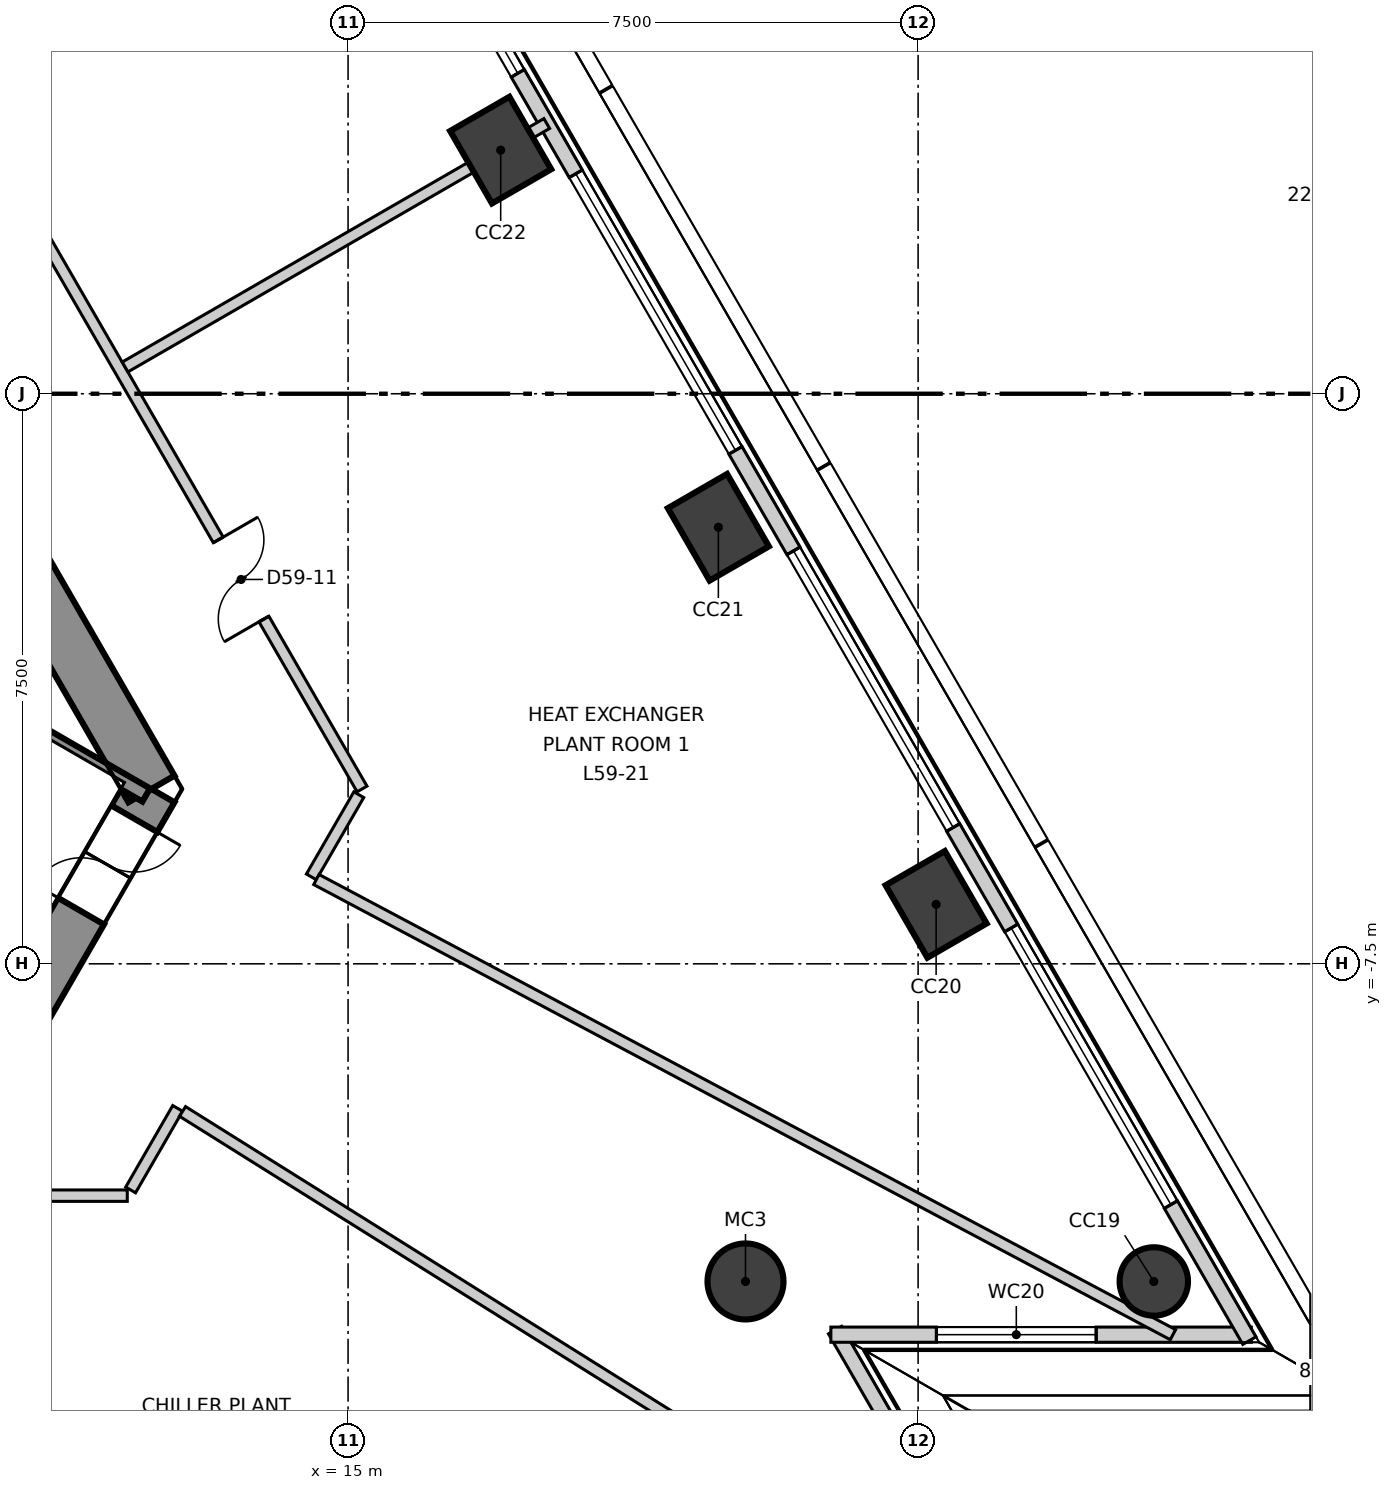
"""IFC4 building model, lengths in metres.
Left out: names, types, materials, properties, quantities, classifications, styles, units other than length and angle.
Written with IfcOpenShell. Run it as: python <this file> out.ifc"""

import sys

from ifc_helpers import new_model, si_unit, direction, frame, frame_2d, origin, origin_2d, place, context, subcontext, project, spatial, polyline, rectangle, circle, outline, extrude, element, fill, save


model = new_model("IFC4")
c1 = context("Model", 3, precision=1e-05, world=origin(), true_north=direction((0.0, 1.0)))
c2 = subcontext(c1, "Body", "Model", "MODEL_VIEW")
j1 = project(units=[si_unit("LENGTHUNIT", "METRE"), si_unit("PLANEANGLEUNIT", "RADIAN")], contexts=[c1])
p1 = place(None, origin())
s1 = spatial("IfcSite", under=j1, at=p1, CompositionType="ELEMENT")
p2 = place(p1, origin())
s2 = spatial("IfcBuilding", under=s1, at=p2, CompositionType="ELEMENT")
p3 = place(p2, frame((0.0, 0.0, 251.3)))
s3 = spatial("IfcBuildingStorey", under=s2, at=p3, CompositionType="ELEMENT", Elevation=251.3)
p4 = place(p3, frame((10.71, -8.15, -0.3), z_axis=(0.0, 0.0, 1.0), x_axis=(0.49999337185, 0.866029230515, 0.0)))
e1 = element("IfcWall", 1, at=p4, inside=s3, PredefinedType="SHEAR", context=c2, shape_type="SweptSolid", body=[
    extrude(outline(polyline([(-0.202, -0.35), (1.703, -0.35), (3.608, -0.35), (3.204, 0.35), (1.703, 0.35), (0.202, 0.35), (-0.202, -0.35)])), origin(), (0.0, 0.0, 1.0), 4.2),
])
p5 = place(p4, frame((1.553, 0.0, 0.3)))
e2 = element("IfcOpeningElement", 2, at=p5, cuts=e1, PredefinedType="OPENING", context=c2, shape_type="SweptSolid", body=[
    extrude(rectangle(XDim=1.4, YDim=2.1, at=frame_2d((0.7, 1.05))), frame((0.0, 0.36, 0.0), z_axis=(0.0, -1.0, 0.0), x_axis=(1.0, 0.0, 0.0)), (0.0, 0.0, 1.0), 0.72),
])
p6 = place(p3, frame((12.413, -5.2, -0.3), z_axis=(0.0, 0.0, 1.0), x_axis=(-0.500011533395, 0.866018744874, 0.0)))
e3 = element("IfcWall", 3, at=p6, inside=s3, PredefinedType="SHEAR", context=c2, shape_type="SweptSolid", body=[
    extrude(outline(polyline([(-0.202, -0.35), (1.782, -0.35), (3.766, -0.35), (5.75, -0.35), (7.734, -0.35), (9.718, -0.35), (11.702, -0.35), (13.686, -0.35), (15.67, -0.35), (17.654, -0.35), (19.638, -0.35), (21.622, -0.35), (21.218, 0.35), (19.307, 0.35), (17.397, 0.35), (15.486, 0.35), (13.576, 0.35), (11.665, 0.35), (9.755, 0.35), (7.844, 0.35), (5.934, 0.35), (4.023, 0.35), (2.113, 0.35), (0.202, 0.35), (-0.202, -0.35)])), origin(), (0.0, 0.0, 1.0), 4.2),
])
p7 = place(p6, frame((4.055, 0.0, 0.3)))
e4 = element("IfcOpeningElement", 4, at=p7, cuts=e3, PredefinedType="OPENING", context=c2, shape_type="SweptSolid", body=[
    extrude(rectangle(XDim=0.9, YDim=2.1, at=frame_2d((0.45, 1.05))), frame((0.0, 0.36, 0.0), z_axis=(0.0, -1.0, 0.0), x_axis=(1.0, 0.0, 0.0)), (0.0, 0.0, 1.0), 0.72),
])
p8 = place(p6, frame((16.465, 0.0, 0.3)))
e5 = element("IfcOpeningElement", 5, at=p8, cuts=e3, PredefinedType="OPENING", context=c2, shape_type="SweptSolid", body=[
    extrude(rectangle(XDim=0.9, YDim=2.1, at=frame_2d((0.45, 1.05))), frame((0.0, 0.36, 0.0), z_axis=(0.0, -1.0, 0.0), x_axis=(1.0, 0.0, 0.0)), (0.0, 0.0, 1.0), 0.72),
])
p9 = place(p3, frame((25.601, -11.679, -0.3), z_axis=(0.0, 0.0, 1.0), x_axis=(-0.5, 0.866025403784, 0.0)))
e6 = element("IfcColumn", 6, at=p9, inside=s3, PredefinedType="COLUMN", context=c2, shape_type="SweptSolid", body=[
    extrude(circle(Radius=0.45, at=origin_2d()), origin(), (0.0, 0.0, 1.0), 4.2),
])
for number, where, z_axis, x_axis in (
    (7, (22.737, -6.718, -0.3), (0.0, 0.0, 1.0), (-0.5, 0.866, 0.0)),
    (8, (19.872, -1.757, -0.3), (0.0, 0.0, 1.0), (-0.5, 0.866, 0.0)),
    (9, (17.008, 3.205, -0.3), (0.0, 0.0, 1.0), (-0.5, 0.866, 0.0)),
):
    element("IfcColumn", number, at=place(p3, frame(where, z_axis=z_axis, x_axis=x_axis)), inside=s3, PredefinedType="COLUMN", context=c2, shape_type="SweptSolid", body=[
        extrude(rectangle(XDim=1.1, YDim=0.9, at=origin_2d()), origin(), (0.0, 0.0, 1.0), 4.2),
    ])
p10 = place(p3, frame((20.229, -11.679, -0.3), z_axis=(0.0, 0.0, 1.0), x_axis=(1.0, 0.0, 0.0)))
e10 = element("IfcColumn", 10, at=p10, inside=s3, PredefinedType="COLUMN", context=c2, shape_type="SweptSolid", body=[
    extrude(circle(Radius=0.5, at=origin_2d()), origin(), (0.0, 0.0, 1.0), 4.2),
])
p11 = place(p3, frame((24.173, -17.11, 0.0), z_axis=(0.0, 0.0, 1.0), x_axis=(-0.499926164748, 0.866068028391, 0.0)))
e11 = element("IfcWall", 11, at=p11, inside=s3, PredefinedType="ELEMENTEDWALL", context=c2, shape_type="SweptSolid", body=[
    extrude(rectangle(XDim=5.533, YDim=0.2, at=frame_2d((2.767, 0.0))), origin(), (0.0, 0.0, 1.0), 3.9),
])
p12 = place(p11, frame((1.99, 0.0, 0.9)))
e12 = element("IfcOpeningElement", 12, at=p12, cuts=e11, PredefinedType="OPENING", context=c2, shape_type="SweptSolid", body=[
    extrude(rectangle(XDim=2.1, YDim=2.5, at=frame_2d((1.05, 1.25))), frame((0.0, 0.11, 0.0), z_axis=(0.0, -1.0, 0.0), x_axis=(1.0, 0.0, 0.0)), (0.0, 0.0, 1.0), 0.22),
])
p13 = place(p3, frame((21.352, -12.379, 0.0), z_axis=(0.0, 0.0, 1.0), x_axis=(1.0, 0.0, 0.0)))
e13 = element("IfcWall", 13, at=p13, inside=s3, PredefinedType="ELEMENTEDWALL", context=c2, shape_type="SweptSolid", body=[
    extrude(rectangle(XDim=5.532, YDim=0.2, at=frame_2d((2.766, 0.0))), origin(), (0.0, 0.0, 1.0), 3.9),
])
p14 = place(p13, frame((1.39, 0.0, 0.9)))
e14 = element("IfcOpeningElement", 14, at=p14, cuts=e13, PredefinedType="OPENING", context=c2, shape_type="SweptSolid", body=[
    extrude(rectangle(XDim=2.1, YDim=2.5, at=frame_2d((1.05, 1.25))), frame((0.0, 0.11, 0.0), z_axis=(0.0, -1.0, 0.0), x_axis=(1.0, 0.0, 0.0)), (0.0, 0.0, 1.0), 0.22),
])
p15 = place(p3, frame((26.859, -12.457, 0.0), z_axis=(0.0, 0.0, 1.0), x_axis=(-0.500004868955, 0.866022592674, 0.0)))
e15 = element("IfcWall", 15, at=p15, inside=s3, PredefinedType="ELEMENTEDWALL", context=c2, shape_type="SweptSolid", body=[
    extrude(rectangle(XDim=48.416, YDim=0.2, at=frame_2d((24.208, 0.0))), origin(), (0.0, 0.0, 1.0), 3.9),
])
p16 = place(p15, frame((2.067, 0.0, 0.9)))
e16 = element("IfcOpeningElement", 16, at=p16, cuts=e15, PredefinedType="OPENING", context=c2, shape_type="SweptSolid", body=[
    extrude(rectangle(XDim=4.2, YDim=2.5, at=frame_2d((2.1, 1.25))), frame((0.0, 0.11, 0.0), z_axis=(0.0, -1.0, 0.0), x_axis=(1.0, 0.0, 0.0)), (0.0, 0.0, 1.0), 0.22),
])
p17 = place(p15, frame((7.796, 0.0, 0.9)))
e17 = element("IfcOpeningElement", 17, at=p17, cuts=e15, PredefinedType="OPENING", context=c2, shape_type="SweptSolid", body=[
    extrude(rectangle(XDim=4.2, YDim=2.5, at=frame_2d((2.1, 1.25))), frame((0.0, 0.11, 0.0), z_axis=(0.0, -1.0, 0.0), x_axis=(1.0, 0.0, 0.0)), (0.0, 0.0, 1.0), 0.22),
])
p18 = place(p15, frame((13.525, 0.0, 0.9)))
e18 = element("IfcOpeningElement", 18, at=p18, cuts=e15, PredefinedType="OPENING", context=c2, shape_type="SweptSolid", body=[
    extrude(rectangle(XDim=4.2, YDim=2.5, at=frame_2d((2.1, 1.25))), frame((0.0, 0.11, 0.0), z_axis=(0.0, -1.0, 0.0), x_axis=(1.0, 0.0, 0.0)), (0.0, 0.0, 1.0), 0.22),
])
p19 = place(p15, frame((19.253, 0.0, 0.9)))
e19 = element("IfcOpeningElement", 19, at=p19, cuts=e15, PredefinedType="OPENING", context=c2, shape_type="SweptSolid", body=[
    extrude(rectangle(XDim=4.2, YDim=2.5, at=frame_2d((2.1, 1.25))), frame((0.0, 0.11, 0.0), z_axis=(0.0, -1.0, 0.0), x_axis=(1.0, 0.0, 0.0)), (0.0, 0.0, 1.0), 0.22),
])
p20 = place(p15, frame((24.982, 0.0, 0.9)))
e20 = element("IfcOpeningElement", 20, at=p20, cuts=e15, PredefinedType="OPENING", context=c2, shape_type="SweptSolid", body=[
    extrude(rectangle(XDim=4.2, YDim=2.5, at=frame_2d((2.1, 1.25))), frame((0.0, 0.11, 0.0), z_axis=(0.0, -1.0, 0.0), x_axis=(1.0, 0.0, 0.0)), (0.0, 0.0, 1.0), 0.22),
])
p21 = place(p15, frame((30.711, 0.0, 0.9)))
e21 = element("IfcOpeningElement", 21, at=p21, cuts=e15, PredefinedType="OPENING", context=c2, shape_type="SweptSolid", body=[
    extrude(rectangle(XDim=4.2, YDim=2.5, at=frame_2d((2.1, 1.25))), frame((0.0, 0.11, 0.0), z_axis=(0.0, -1.0, 0.0), x_axis=(1.0, 0.0, 0.0)), (0.0, 0.0, 1.0), 0.22),
])
p22 = place(p15, frame((36.44, 0.0, 0.9)))
e22 = element("IfcOpeningElement", 22, at=p22, cuts=e15, PredefinedType="OPENING", context=c2, shape_type="SweptSolid", body=[
    extrude(rectangle(XDim=4.2, YDim=2.5, at=frame_2d((2.1, 1.25))), frame((0.0, 0.11, 0.0), z_axis=(0.0, -1.0, 0.0), x_axis=(1.0, 0.0, 0.0)), (0.0, 0.0, 1.0), 0.22),
])
p23 = place(p15, frame((42.168, 0.0, 0.9)))
e23 = element("IfcOpeningElement", 23, at=p23, cuts=e15, PredefinedType="OPENING", context=c2, shape_type="SweptSolid", body=[
    extrude(rectangle(XDim=4.2, YDim=2.5, at=frame_2d((2.1, 1.25))), frame((0.0, 0.11, 0.0), z_axis=(0.0, -1.0, 0.0), x_axis=(1.0, 0.0, 0.0)), (0.0, 0.0, 1.0), 0.22),
])
p24 = place(p3, frame((-12.009, -10.55, 0.0), z_axis=(0.0, 0.0, 1.0), x_axis=(1.0, 0.0, 0.0)))
e24 = element("IfcWall", 24, at=p24, inside=s3, PredefinedType="PARTITIONING", context=c2, shape_type="SweptSolid", body=[
    extrude(rectangle(XDim=24.104, YDim=0.15, at=frame_2d((12.052, 0.0))), origin(), (0.0, 0.0, 1.0), 3.9),
])
p25 = place(p24, frame((2.497, 0.0, 0.0)))
e25 = element("IfcOpeningElement", 25, at=p25, cuts=e24, PredefinedType="OPENING", context=c2, shape_type="SweptSolid", body=[
    extrude(rectangle(XDim=1.2, YDim=2.1, at=frame_2d((0.6, 1.05))), frame((0.0, 0.085, 0.0), z_axis=(0.0, -1.0, 0.0), x_axis=(1.0, 0.0, 0.0)), (0.0, 0.0, 1.0), 0.17),
])
p26 = place(p24, frame((8.644, 0.0, 0.0)))
e26 = element("IfcOpeningElement", 26, at=p26, cuts=e24, PredefinedType="OPENING", context=c2, shape_type="SweptSolid", body=[
    extrude(rectangle(XDim=1.0, YDim=2.1, at=frame_2d((0.5, 1.05))), frame((0.0, 0.085, 0.0), z_axis=(0.0, -1.0, 0.0), x_axis=(1.0, 0.0, 0.0)), (0.0, 0.0, 1.0), 0.17),
])
p27 = place(p24, frame((14.373, 0.0, 0.0)))
e27 = element("IfcOpeningElement", 27, at=p27, cuts=e24, PredefinedType="OPENING", context=c2, shape_type="SweptSolid", body=[
    extrude(rectangle(XDim=1.0, YDim=2.1, at=frame_2d((0.5, 1.05))), frame((0.0, 0.085, 0.0), z_axis=(0.0, -1.0, 0.0), x_axis=(1.0, 0.0, 0.0)), (0.0, 0.0, 1.0), 0.17),
])
p28 = place(p24, frame((20.321, 0.0, 0.0)))
e28 = element("IfcOpeningElement", 28, at=p28, cuts=e24, PredefinedType="OPENING", context=c2, shape_type="SweptSolid", body=[
    extrude(rectangle(XDim=1.2, YDim=2.1, at=frame_2d((0.6, 1.05))), frame((0.0, 0.085, 0.0), z_axis=(0.0, -1.0, 0.0), x_axis=(1.0, 0.0, 0.0)), (0.0, 0.0, 1.0), 0.17),
])
p29 = place(p3, frame((3.132, 15.675, 0.0), z_axis=(0.0, 0.0, 1.0), x_axis=(0.499994246357, -0.866028725626, 0.0)))
e29 = element("IfcWall", 29, at=p29, inside=s3, PredefinedType="PARTITIONING", context=c2, shape_type="SweptSolid", body=[
    extrude(rectangle(XDim=24.104, YDim=0.15, at=frame_2d((12.052, 0.0))), origin(), (0.0, 0.0, 1.0), 3.9),
])
p30 = place(p29, frame((20.321, 0.0, 0.0)))
e30 = element("IfcOpeningElement", 30, at=p30, cuts=e29, PredefinedType="OPENING", context=c2, shape_type="SweptSolid", body=[
    extrude(rectangle(XDim=1.2, YDim=2.1, at=frame_2d((0.6, 1.05))), frame((0.0, 0.085, 0.0), z_axis=(0.0, -1.0, 0.0), x_axis=(1.0, 0.0, 0.0)), (0.0, 0.0, 1.0), 0.17),
])
p31 = place(p29, frame((11.508, 0.0, 0.0)))
e31 = element("IfcOpeningElement", 31, at=p31, cuts=e29, PredefinedType="OPENING", context=c2, shape_type="SweptSolid", body=[
    extrude(rectangle(XDim=1.0, YDim=2.1, at=frame_2d((0.5, 1.05))), frame((0.0, 0.085, 0.0), z_axis=(0.0, -1.0, 0.0), x_axis=(1.0, 0.0, 0.0)), (0.0, 0.0, 1.0), 0.17),
])
p32 = place(p29, frame((2.497, 0.0, 0.0)))
e32 = element("IfcOpeningElement", 32, at=p32, cuts=e29, PredefinedType="OPENING", context=c2, shape_type="SweptSolid", body=[
    extrude(rectangle(XDim=1.2, YDim=2.1, at=frame_2d((0.6, 1.05))), frame((0.0, 0.085, 0.0), z_axis=(0.0, -1.0, 0.0), x_axis=(1.0, 0.0, 0.0)), (0.0, 0.0, 1.0), 0.17),
])
p33 = place(p3, frame((12.139, -10.475, 0.0), z_axis=(0.0, 0.0, 1.0), x_axis=(0.499785009086, 0.86614949327, 0.0)))
e33 = element("IfcWall", 33, at=p33, inside=s3, PredefinedType="PARTITIONING", context=c2, shape_type="SweptSolid", body=[
    extrude(rectangle(XDim=1.239, YDim=0.15, at=frame_2d((0.619, 0.0))), origin(), (0.0, 0.0, 1.0), 3.9),
])
p34 = place(p3, frame((14.517, -6.356, 0.0), z_axis=(0.0, 0.0, 1.0), x_axis=(0.499925626596, 0.866068339032, 0.0)))
e34 = element("IfcWall", 34, at=p34, inside=s3, PredefinedType="PARTITIONING", context=c2, shape_type="SweptSolid", body=[
    extrude(rectangle(XDim=1.248, YDim=0.15, at=frame_2d((0.624, 0.0))), origin(), (0.0, 0.0, 1.0), 3.9),
])
p35 = place(p3, frame((12.822, -9.442, 0.0), z_axis=(0.0, 0.0, 1.0), x_axis=(0.847570249745, -0.530683212233, 0.0)))
e35 = element("IfcWall", 35, at=p35, inside=s3, PredefinedType="PARTITIONING", context=c2, shape_type="SweptSolid", body=[
    extrude(rectangle(XDim=12.793, YDim=0.15, at=frame_2d((6.396, 0.0))), origin(), (0.0, 0.0, 1.0), 3.3),
])
p36 = place(p3, frame((12.066, 0.352, 0.0), z_axis=(0.0, 0.0, 1.0), x_axis=(0.866046605956, 0.499963274963, 0.0)))
e36 = element("IfcWall", 36, at=p36, inside=s3, PredefinedType="PARTITIONING", context=c2, shape_type="SweptSolid", body=[
    extrude(rectangle(XDim=6.406, YDim=0.15, at=frame_2d((3.203, 0.0))), origin(), (0.0, 0.0, 1.0), 3.9),
])
p37 = place(p3, frame((14.583, -6.391, 0.0), z_axis=(0.0, 0.0, 1.0), x_axis=(0.883096398923, -0.469191592219, 0.0)))
e37 = element("IfcWall", 37, at=p37, inside=s3, PredefinedType="PARTITIONING", context=c2, shape_type="SweptSolid", body=[
    extrude(rectangle(XDim=12.762, YDim=0.15, at=frame_2d((6.381, 0.0))), origin(), (0.0, 0.0, 1.0), 3.3),
])
p38 = place(p3, frame((6.529, -1.922, 0.0), z_axis=(0.0, 0.0, 1.0), x_axis=(0.866046323291, -0.499963764601, 0.0)))
e38 = element("IfcWall", 38, at=p38, inside=s3, PredefinedType="SOLIDWALL", context=c2, shape_type="SweptSolid", body=[
    extrude(rectangle(XDim=6.714, YDim=0.2, at=frame_2d((3.357, 0.0))), origin(), (0.0, 0.0, 1.0), 3.9),
])
p39 = place(p14, origin())
e39 = element("IfcWindow", 39, at=p39, inside=s3, PartitioningType="SINGLE_PANEL", PredefinedType="WINDOW", context=c2, shape_type="SweptSolid", body=[
    extrude(rectangle(XDim=2.1, YDim=2.5, at=frame_2d((1.05, 1.25))), frame((0.0, 0.03, 0.0), z_axis=(0.0, -1.0, 0.0), x_axis=(1.0, 0.0, 0.0)), (0.0, 0.0, 1.0), 0.06),
])
fill(e14, e39)
p40 = place(p16, origin())
e40 = element("IfcWindow", 40, at=p40, inside=s3, PartitioningType="SINGLE_PANEL", PredefinedType="WINDOW", context=c2, shape_type="SweptSolid", body=[
    extrude(rectangle(XDim=4.2, YDim=2.5, at=frame_2d((2.1, 1.25))), frame((0.0, 0.03, 0.0), z_axis=(0.0, -1.0, 0.0), x_axis=(1.0, 0.0, 0.0)), (0.0, 0.0, 1.0), 0.06),
])
fill(e16, e40)
p41 = place(p17, origin())
e41 = element("IfcWindow", 41, at=p41, inside=s3, PartitioningType="SINGLE_PANEL", PredefinedType="WINDOW", context=c2, shape_type="SweptSolid", body=[
    extrude(rectangle(XDim=4.2, YDim=2.5, at=frame_2d((2.1, 1.25))), frame((0.0, 0.03, 0.0), z_axis=(0.0, -1.0, 0.0), x_axis=(1.0, 0.0, 0.0)), (0.0, 0.0, 1.0), 0.06),
])
fill(e17, e41)
p42 = place(p18, origin())
e42 = element("IfcWindow", 42, at=p42, inside=s3, PartitioningType="SINGLE_PANEL", PredefinedType="WINDOW", context=c2, shape_type="SweptSolid", body=[
    extrude(rectangle(XDim=4.2, YDim=2.5, at=frame_2d((2.1, 1.25))), frame((0.0, 0.03, 0.0), z_axis=(0.0, -1.0, 0.0), x_axis=(1.0, 0.0, 0.0)), (0.0, 0.0, 1.0), 0.06),
])
fill(e18, e42)
p43 = place(p19, origin())
e43 = element("IfcWindow", 43, at=p43, inside=s3, PartitioningType="SINGLE_PANEL", PredefinedType="WINDOW", context=c2, shape_type="SweptSolid", body=[
    extrude(rectangle(XDim=4.2, YDim=2.5, at=frame_2d((2.1, 1.25))), frame((0.0, 0.03, 0.0), z_axis=(0.0, -1.0, 0.0), x_axis=(1.0, 0.0, 0.0)), (0.0, 0.0, 1.0), 0.06),
])
fill(e19, e43)
p44 = place(p30, origin())
e44 = element("IfcDoor", 44, at=p44, inside=s3, OperationType="DOUBLE_DOOR_SINGLE_SWING", PredefinedType="DOOR", context=c2, shape_type="SweptSolid", body=[
    extrude(rectangle(XDim=1.2, YDim=2.1, at=frame_2d((0.6, 1.05))), frame((0.0, 0.025, 0.0), z_axis=(0.0, -1.0, 0.0), x_axis=(1.0, 0.0, 0.0)), (0.0, 0.0, 1.0), 0.05),
])
fill(e30, e44)
p45 = place(p5, origin())
e45 = element("IfcDoor", 45, at=p45, inside=s3, OperationType="DOUBLE_DOOR_SINGLE_SWING", PredefinedType="DOOR", context=c2, shape_type="SweptSolid", body=[
    extrude(rectangle(XDim=1.4, YDim=2.1, at=frame_2d((0.7, 1.05))), frame((0.0, 0.025, 0.0), z_axis=(0.0, -1.0, 0.0), x_axis=(1.0, 0.0, 0.0)), (0.0, 0.0, 1.0), 0.05),
])
fill(e2, e45)
save(model, sys.argv[1])
